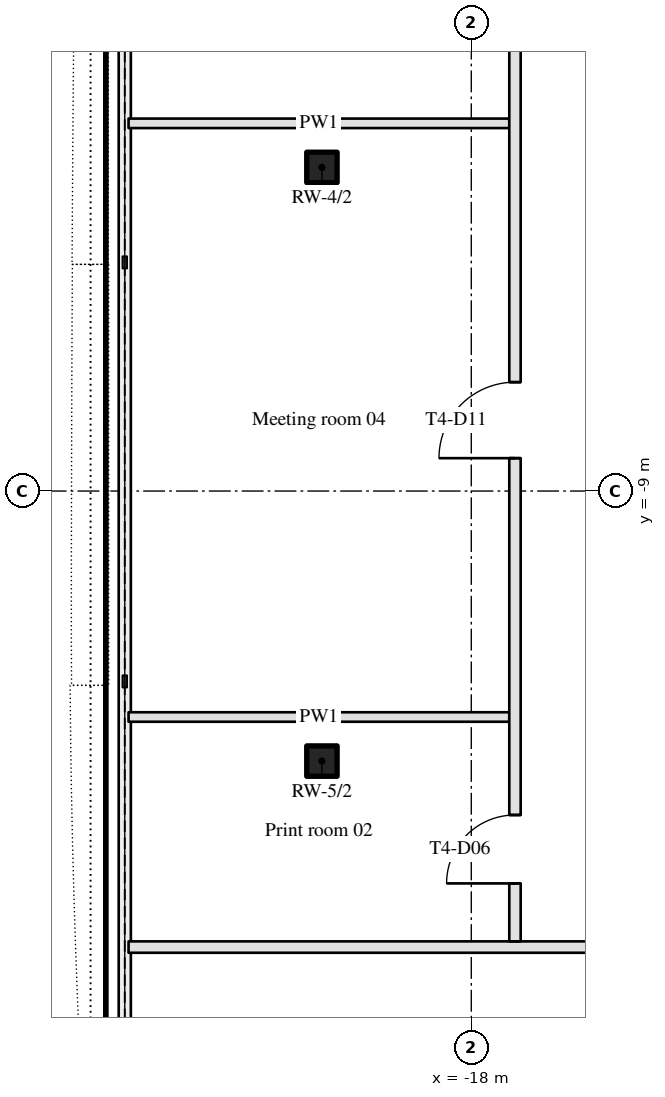
"""IFC4 building model, lengths in metres.
Left out: names, types, materials, properties, quantities, classifications, styles, units other than length and angle.
Written with IfcOpenShell. Run it as: python <this file> out.ifc"""

import sys

from ifc_helpers import new_model, si_unit, direction, frame, frame_2d, origin, origin_2d, place, context, subcontext, project, spatial, rectangle, hollow_rectangle, extrude, element, fill, save


model = new_model("IFC4")
c1 = context("Model", 3, precision=1e-05, world=origin(), true_north=direction((0.0, 1.0)))
c2 = subcontext(c1, "Body", "Model", "MODEL_VIEW")
j1 = project(units=[si_unit("LENGTHUNIT", "METRE"), si_unit("PLANEANGLEUNIT", "RADIAN")], contexts=[c1])
p1 = place(None, origin())
s1 = spatial("IfcSite", under=j1, at=p1, CompositionType="ELEMENT")
p2 = place(p1, origin())
s2 = spatial("IfcBuilding", under=s1, at=p2, CompositionType="ELEMENT")
p3 = place(p2, frame((0.0, 0.0, 62.1)))
s3 = spatial("IfcBuildingStorey", under=s2, at=p3, CompositionType="ELEMENT", Elevation=62.1)
for number, where, z_axis, x_axis in (
    (1, (-19.965, -4.742, 0.0), (0.0, 0.0, 1.0), (1.0, 0.0, 0.0)),
    (2, (-19.965, -12.553, 0.0), (0.0, 0.0, 1.0), (1.0, 0.0, 0.0)),
):
    element("IfcColumn", number, at=place(p3, frame(where, z_axis=z_axis, x_axis=x_axis)), inside=s3, PredefinedType="COLUMN", context=c2, shape_type="SweptSolid", body=[
        extrude(hollow_rectangle(XDim=0.4, YDim=0.4, WallThickness=0.025, InnerFilletRadius=0.038, OuterFilletRadius=0.062, at=origin_2d()), origin(), (0.0, 0.0, 1.0), 3.9),
    ])
p4 = place(p3, frame((-22.509, -15.0, 0.0), z_axis=(0.0, 0.0, 1.0), x_axis=(1.0, 0.0, 0.0)))
e3 = element("IfcWall", 3, at=p4, inside=s3, PredefinedType="PARTITIONING", context=c2, shape_type="SweptSolid", body=[
    extrude(rectangle(XDim=51.018, YDim=0.15, at=frame_2d((25.509, 0.0))), origin(), (0.0, 0.0, 1.0), 2.96),
])
p5 = place(p4, frame((12.896, 0.0, 0.0)))
e4 = element("IfcOpeningElement", 4, at=p5, cuts=e3, PredefinedType="OPENING", context=c2, shape_type="SweptSolid", body=[
    extrude(rectangle(XDim=1.8, YDim=2.1, at=frame_2d((0.9, 1.05))), frame((0.0, 0.085, 0.0), z_axis=(0.0, -1.0, 0.0), x_axis=(1.0, 0.0, 0.0)), (0.0, 0.0, 1.0), 0.17),
])
p6 = place(p4, frame((30.322, 0.0, 0.0)))
e5 = element("IfcOpeningElement", 5, at=p6, cuts=e3, PredefinedType="OPENING", context=c2, shape_type="SweptSolid", body=[
    extrude(rectangle(XDim=1.8, YDim=2.1, at=frame_2d((0.9, 1.05))), frame((0.0, 0.085, 0.0), z_axis=(0.0, -1.0, 0.0), x_axis=(1.0, 0.0, 0.0)), (0.0, 0.0, 1.0), 0.17),
])
for number, where, z_axis, x_axis in (
    (6, (-22.509, -11.973, 0.0), (0.0, 0.0, 1.0), (1.0, 0.0, 0.0)),
    (7, (-22.509, -4.162, 0.0), (0.0, 0.0, 1.0), (1.0, 0.0, 0.0)),
):
    element("IfcWall", number, at=place(p3, frame(where, z_axis=z_axis, x_axis=x_axis)), inside=s3, PredefinedType="PARTITIONING", context=c2, shape_type="SweptSolid", body=[
        extrude(rectangle(XDim=5.009, YDim=0.125, at=frame_2d((2.504, 0.0))), origin(), (0.0, 0.0, 1.0), 2.96),
    ])
p7 = place(p3, frame((-17.425, -14.925, 0.0), z_axis=(0.0, 0.0, 1.0), x_axis=(0.0, 1.0, 0.0)))
e8 = element("IfcWall", 8, at=p7, inside=s3, PredefinedType="PARTITIONING", context=c2, shape_type="SweptSolid", body=[
    extrude(rectangle(XDim=26.405, YDim=0.15, at=frame_2d((13.203, 0.0))), origin(), (0.0, 0.0, 1.0), 2.96),
])
p8 = place(p7, frame((0.762, 0.0, 0.0)))
e9 = element("IfcOpeningElement", 9, at=p8, cuts=e8, PredefinedType="OPENING", context=c2, shape_type="SweptSolid", body=[
    extrude(rectangle(XDim=0.9, YDim=2.1, at=frame_2d((0.45, 1.05))), frame((0.0, 0.085, 0.0), z_axis=(0.0, -1.0, 0.0), x_axis=(1.0, 0.0, 0.0)), (0.0, 0.0, 1.0), 0.17),
])
p9 = place(p7, frame((6.357, 0.0, 0.0)))
e10 = element("IfcOpeningElement", 10, at=p9, cuts=e8, PredefinedType="OPENING", context=c2, shape_type="SweptSolid", body=[
    extrude(rectangle(XDim=1.0, YDim=2.1, at=frame_2d((0.5, 1.05))), frame((0.0, 0.085, 0.0), z_axis=(0.0, -1.0, 0.0), x_axis=(1.0, 0.0, 0.0)), (0.0, 0.0, 1.0), 0.17),
])
p10 = place(p7, frame((14.168, 0.0, 0.0)))
e11 = element("IfcOpeningElement", 11, at=p10, cuts=e8, PredefinedType="OPENING", context=c2, shape_type="SweptSolid", body=[
    extrude(rectangle(XDim=1.0, YDim=2.1, at=frame_2d((0.5, 1.05))), frame((0.0, 0.085, 0.0), z_axis=(0.0, -1.0, 0.0), x_axis=(1.0, 0.0, 0.0)), (0.0, 0.0, 1.0), 0.17),
])
p11 = place(p7, frame((21.052, 0.0, 0.0)))
e12 = element("IfcOpeningElement", 12, at=p11, cuts=e8, PredefinedType="OPENING", context=c2, shape_type="SweptSolid", body=[
    extrude(rectangle(XDim=1.0, YDim=2.1, at=frame_2d((0.5, 1.05))), frame((0.0, 0.085, 0.0), z_axis=(0.0, -1.0, 0.0), x_axis=(1.0, 0.0, 0.0)), (0.0, 0.0, 1.0), 0.17),
])
p12 = place(p8, origin())
e13 = element("IfcDoor", 13, at=p12, inside=s3, OperationType="SINGLE_SWING_LEFT", PredefinedType="DOOR", context=c2, shape_type="SweptSolid", body=[
    extrude(rectangle(XDim=0.9, YDim=2.1, at=frame_2d((0.45, 1.05))), frame((0.0, 0.025, 0.0), z_axis=(0.0, -1.0, 0.0), x_axis=(1.0, 0.0, 0.0)), (0.0, 0.0, 1.0), 0.05),
])
fill(e9, e13)
p13 = place(p9, origin())
e14 = element("IfcDoor", 14, at=p13, inside=s3, OperationType="SINGLE_SWING_LEFT", PredefinedType="DOOR", context=c2, shape_type="SweptSolid", body=[
    extrude(rectangle(XDim=1.0, YDim=2.1, at=frame_2d((0.5, 1.05))), frame((0.0, 0.025, 0.0), z_axis=(0.0, -1.0, 0.0), x_axis=(1.0, 0.0, 0.0)), (0.0, 0.0, 1.0), 0.05),
])
fill(e10, e14)
save(model, sys.argv[1])
